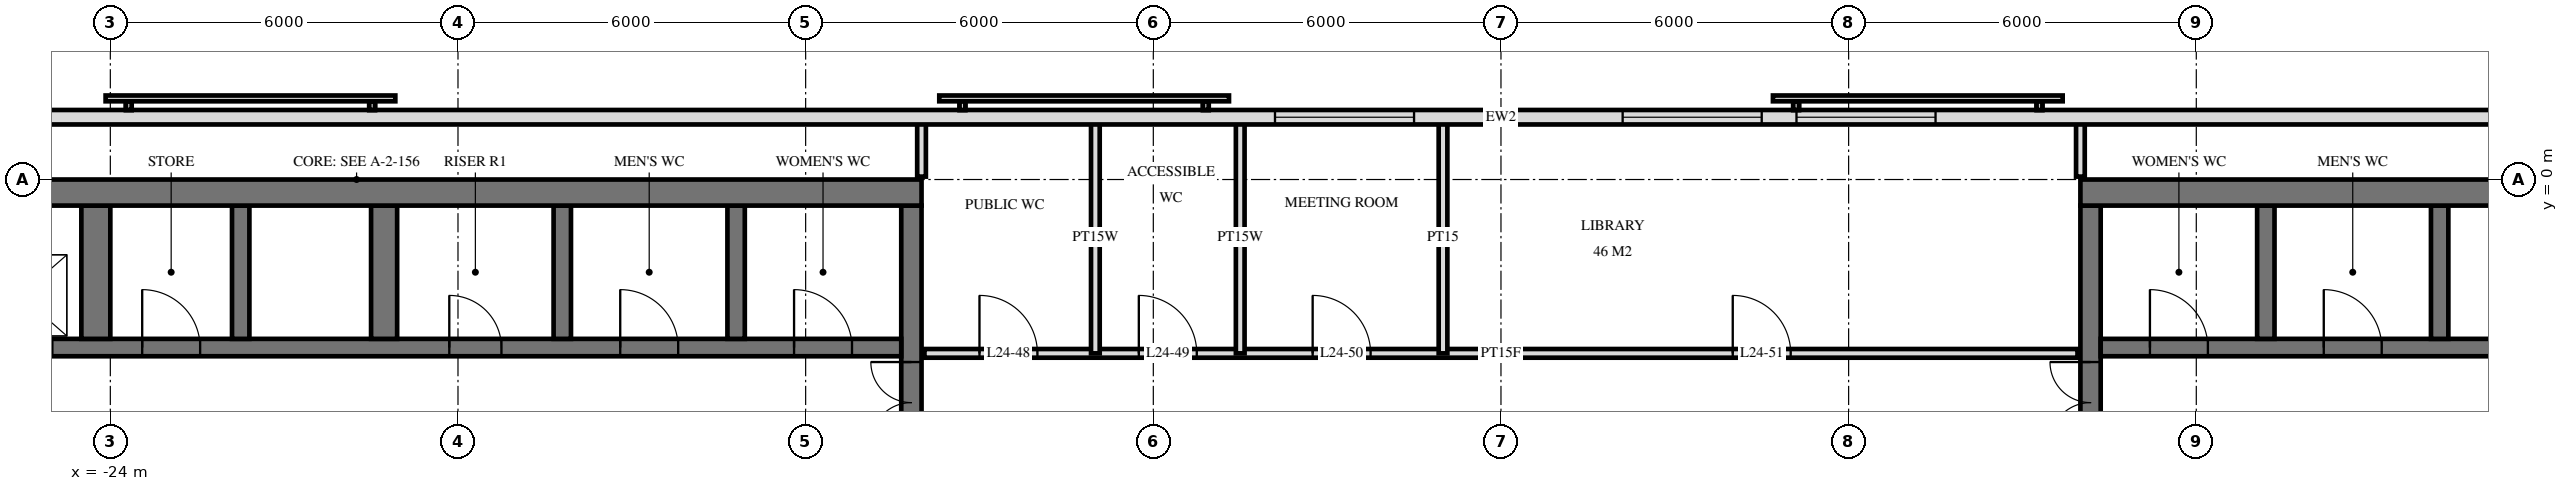
"""IFC4 building model, lengths in metres.
Left out: names, types, materials, properties, quantities, classifications, styles, units other than length and angle.
Written with IfcOpenShell. Run it as: python <this file> out.ifc"""

import sys

from ifc_helpers import new_model, si_unit, direction, frame, frame_2d, origin, place, context, subcontext, project, spatial, rectangle, extrude, element, fill, save


model = new_model("IFC4")
c1 = context("Model", 3, precision=1e-05, world=origin(), true_north=direction((0.0, 1.0)))
c2 = subcontext(c1, "Body", "Model", "MODEL_VIEW")
j1 = project(units=[si_unit("LENGTHUNIT", "METRE"), si_unit("PLANEANGLEUNIT", "RADIAN")], contexts=[c1])
p1 = place(None, origin())
s1 = spatial("IfcSite", under=j1, at=p1, CompositionType="ELEMENT")
p2 = place(p1, origin())
s2 = spatial("IfcBuilding", under=s1, at=p2, CompositionType="ELEMENT")
p3 = place(p2, frame((0.0, 0.0, 96.0)))
s3 = spatial("IfcBuildingStorey", under=s2, at=p3, CompositionType="ELEMENT", Elevation=96.0)
p4 = place(p3, frame((-29.5, -0.225, 0.0), z_axis=(0.0, 0.0, 1.0), x_axis=(1.0, 0.0, 0.0)))
e1 = element("IfcWall", 1, at=p4, inside=s3, PredefinedType="SHEAR", context=c2, shape_type="SweptSolid", body=[
    extrude(rectangle(XDim=19.5, YDim=0.45, at=frame_2d((9.75, 0.0))), origin(), (0.0, 0.0, 1.0), 3.6),
])
p5 = place(p3, frame((-10.175, -14.55, 0.0), z_axis=(0.0, 0.0, 1.0), x_axis=(0.0, 1.0, 0.0)))
e2 = element("IfcWall", 2, at=p5, inside=s3, PredefinedType="SHEAR", context=c2, shape_type="SweptSolid", body=[
    extrude(rectangle(XDim=14.1, YDim=0.35, at=frame_2d((7.05, 0.0))), origin(), (0.0, 0.0, 1.0), 3.6),
])
p6 = place(p5, frame((8.4, 0.0, 0.0)))
e3 = element("IfcOpeningElement", 3, at=p6, cuts=e2, PredefinedType="OPENING", context=c2, shape_type="SweptSolid", body=[
    extrude(rectangle(XDim=1.4, YDim=2.4, at=frame_2d((0.7, 1.2))), frame((0.0, 0.185, 0.0), z_axis=(0.0, -1.0, 0.0), x_axis=(1.0, 0.0, 0.0)), (0.0, 0.0, 1.0), 0.37),
])
p7 = place(p5, frame((10.0, 0.0, 0.0)))
e4 = element("IfcOpeningElement", 4, at=p7, cuts=e2, PredefinedType="OPENING", context=c2, shape_type="SweptSolid", body=[
    extrude(rectangle(XDim=1.4, YDim=2.4, at=frame_2d((0.7, 1.2))), frame((0.0, 0.185, 0.0), z_axis=(0.0, -1.0, 0.0), x_axis=(1.0, 0.0, 0.0)), (0.0, 0.0, 1.0), 0.37),
])
p8 = place(p5, frame((4.0, 0.0, 0.0)))
e5 = element("IfcOpeningElement", 5, at=p8, cuts=e2, PredefinedType="OPENING", context=c2, shape_type="SweptSolid", body=[
    extrude(rectangle(XDim=1.2, YDim=2.1, at=frame_2d((0.6, 1.05))), frame((0.0, 0.185, 0.0), z_axis=(0.0, -1.0, 0.0), x_axis=(1.0, 0.0, 0.0)), (0.0, 0.0, 1.0), 0.37),
])
p9 = place(p3, frame((-29.05, -2.9, 0.0), z_axis=(0.0, 0.0, 1.0), x_axis=(1.0, 0.0, 0.0)))
e6 = element("IfcWall", 6, at=p9, inside=s3, PredefinedType="SHEAR", context=c2, shape_type="SweptSolid", body=[
    extrude(rectangle(XDim=18.7, YDim=0.3, at=frame_2d((9.35, 0.0))), origin(), (0.0, 0.0, 1.0), 3.6),
])
p10 = place(p9, frame((2.95, 0.0, 0.0)))
e7 = element("IfcOpeningElement", 7, at=p10, cuts=e6, PredefinedType="OPENING", context=c2, shape_type="SweptSolid", body=[
    extrude(rectangle(XDim=1.1, YDim=2.1, at=frame_2d((0.55, 1.05))), frame((0.0, 0.16, 0.0), z_axis=(0.0, -1.0, 0.0), x_axis=(1.0, 0.0, 0.0)), (0.0, 0.0, 1.0), 0.32),
])
p11 = place(p9, frame((0.55, 0.0, 0.0)))
e8 = element("IfcOpeningElement", 8, at=p11, cuts=e6, PredefinedType="OPENING", context=c2, shape_type="SweptSolid", body=[
    extrude(rectangle(XDim=1.1, YDim=2.1, at=frame_2d((0.55, 1.05))), frame((0.0, 0.16, 0.0), z_axis=(0.0, -1.0, 0.0), x_axis=(1.0, 0.0, 0.0)), (0.0, 0.0, 1.0), 0.32),
])
p12 = place(p9, frame((10.9, 0.0, 0.0)))
e9 = element("IfcOpeningElement", 9, at=p12, cuts=e6, PredefinedType="OPENING", context=c2, shape_type="SweptSolid", body=[
    extrude(rectangle(XDim=0.9, YDim=2.1, at=frame_2d((0.45, 1.05))), frame((0.0, 0.16, 0.0), z_axis=(0.0, -1.0, 0.0), x_axis=(1.0, 0.0, 0.0)), (0.0, 0.0, 1.0), 0.32),
])
p13 = place(p9, frame((16.85, 0.0, 0.0)))
e10 = element("IfcOpeningElement", 10, at=p13, cuts=e6, PredefinedType="OPENING", context=c2, shape_type="SweptSolid", body=[
    extrude(rectangle(XDim=1.0, YDim=2.1, at=frame_2d((0.5, 1.05))), frame((0.0, 0.16, 0.0), z_axis=(0.0, -1.0, 0.0), x_axis=(1.0, 0.0, 0.0)), (0.0, 0.0, 1.0), 0.32),
])
p14 = place(p9, frame((13.85, 0.0, 0.0)))
e11 = element("IfcOpeningElement", 11, at=p14, cuts=e6, PredefinedType="OPENING", context=c2, shape_type="SweptSolid", body=[
    extrude(rectangle(XDim=1.0, YDim=2.1, at=frame_2d((0.5, 1.05))), frame((0.0, 0.16, 0.0), z_axis=(0.0, -1.0, 0.0), x_axis=(1.0, 0.0, 0.0)), (0.0, 0.0, 1.0), 0.32),
])
p15 = place(p9, frame((5.6, 0.0, 0.0)))
e12 = element("IfcOpeningElement", 12, at=p15, cuts=e6, PredefinedType="OPENING", context=c2, shape_type="SweptSolid", body=[
    extrude(rectangle(XDim=1.0, YDim=2.1, at=frame_2d((0.5, 1.05))), frame((0.0, 0.16, 0.0), z_axis=(0.0, -1.0, 0.0), x_axis=(1.0, 0.0, 0.0)), (0.0, 0.0, 1.0), 0.32),
])
for number, where, z_axis, x_axis in (
    (13, (-13.2, -2.75, 0.0), (0.0, 0.0, 1.0), (0.0, 1.0, 0.0)),
    (14, (-16.2, -2.75, 0.0), (0.0, 0.0, 1.0), (0.0, 1.0, 0.0)),
):
    element("IfcWall", number, at=place(p3, frame(where, z_axis=z_axis, x_axis=x_axis)), inside=s3, PredefinedType="SHEAR", context=c2, shape_type="SweptSolid", body=[
        extrude(rectangle(XDim=2.3, YDim=0.3, at=frame_2d((1.15, 0.0))), origin(), (0.0, 0.0, 1.0), 3.6),
    ])
p16 = place(p3, frame((-19.275, -2.75, 0.0), z_axis=(0.0, 0.0, 1.0), x_axis=(0.0, 1.0, 0.0)))
e15 = element("IfcWall", 15, at=p16, inside=s3, PredefinedType="SHEAR", context=c2, shape_type="SweptSolid", body=[
    extrude(rectangle(XDim=2.3, YDim=0.45, at=frame_2d((1.15, 0.0))), origin(), (0.0, 0.0, 1.0), 3.6),
])
p17 = place(p3, frame((-21.75, -2.75, 0.0), z_axis=(0.0, 0.0, 1.0), x_axis=(0.0, 1.0, 0.0)))
e16 = element("IfcWall", 16, at=p17, inside=s3, PredefinedType="SHEAR", context=c2, shape_type="SweptSolid", body=[
    extrude(rectangle(XDim=2.3, YDim=0.3, at=frame_2d((1.15, 0.0))), origin(), (0.0, 0.0, 1.0), 3.6),
])
p18 = place(p3, frame((-24.25, -2.75, 0.0), z_axis=(0.0, 0.0, 1.0), x_axis=(0.0, 1.0, 0.0)))
e17 = element("IfcWall", 17, at=p18, inside=s3, PredefinedType="SHEAR", context=c2, shape_type="SweptSolid", body=[
    extrude(rectangle(XDim=2.3, YDim=0.5, at=frame_2d((1.15, 0.0))), origin(), (0.0, 0.0, 1.0), 3.6),
])
p19 = place(p3, frame((10.0, -0.225, 0.0), z_axis=(0.0, 0.0, 1.0), x_axis=(1.0, 0.0, 0.0)))
e18 = element("IfcWall", 18, at=p19, inside=s3, PredefinedType="SHEAR", context=c2, shape_type="SweptSolid", body=[
    extrude(rectangle(XDim=19.5, YDim=0.45, at=frame_2d((9.75, 0.0))), origin(), (0.0, 0.0, 1.0), 3.6),
])
p20 = place(p3, frame((10.175, -14.55, 0.0), z_axis=(0.0, 0.0, 1.0), x_axis=(0.0, 1.0, 0.0)))
e19 = element("IfcWall", 19, at=p20, inside=s3, PredefinedType="SHEAR", context=c2, shape_type="SweptSolid", body=[
    extrude(rectangle(XDim=14.1, YDim=0.35, at=frame_2d((7.05, 0.0))), origin(), (0.0, 0.0, 1.0), 3.6),
])
p21 = place(p20, frame((8.4, 0.0, 0.0)))
e20 = element("IfcOpeningElement", 20, at=p21, cuts=e19, PredefinedType="OPENING", context=c2, shape_type="SweptSolid", body=[
    extrude(rectangle(XDim=1.4, YDim=2.4, at=frame_2d((0.7, 1.2))), frame((0.0, 0.185, 0.0), z_axis=(0.0, -1.0, 0.0), x_axis=(1.0, 0.0, 0.0)), (0.0, 0.0, 1.0), 0.37),
])
p22 = place(p20, frame((10.0, 0.0, 0.0)))
e21 = element("IfcOpeningElement", 21, at=p22, cuts=e19, PredefinedType="OPENING", context=c2, shape_type="SweptSolid", body=[
    extrude(rectangle(XDim=1.4, YDim=2.4, at=frame_2d((0.7, 1.2))), frame((0.0, 0.185, 0.0), z_axis=(0.0, -1.0, 0.0), x_axis=(1.0, 0.0, 0.0)), (0.0, 0.0, 1.0), 0.37),
])
p23 = place(p20, frame((4.0, 0.0, 0.0)))
e22 = element("IfcOpeningElement", 22, at=p23, cuts=e19, PredefinedType="OPENING", context=c2, shape_type="SweptSolid", body=[
    extrude(rectangle(XDim=1.2, YDim=2.1, at=frame_2d((0.6, 1.05))), frame((0.0, 0.185, 0.0), z_axis=(0.0, -1.0, 0.0), x_axis=(1.0, 0.0, 0.0)), (0.0, 0.0, 1.0), 0.37),
])
p24 = place(p3, frame((10.35, -2.9, 0.0), z_axis=(0.0, 0.0, 1.0), x_axis=(1.0, 0.0, 0.0)))
e23 = element("IfcWall", 23, at=p24, inside=s3, PredefinedType="SHEAR", context=c2, shape_type="SweptSolid", body=[
    extrude(rectangle(XDim=18.7, YDim=0.3, at=frame_2d((9.35, 0.0))), origin(), (0.0, 0.0, 1.0), 3.6),
])
p25 = place(p24, frame((14.65, 0.0, 0.0)))
e24 = element("IfcOpeningElement", 24, at=p25, cuts=e23, PredefinedType="OPENING", context=c2, shape_type="SweptSolid", body=[
    extrude(rectangle(XDim=1.1, YDim=2.1, at=frame_2d((0.55, 1.05))), frame((0.0, 0.16, 0.0), z_axis=(0.0, -1.0, 0.0), x_axis=(1.0, 0.0, 0.0)), (0.0, 0.0, 1.0), 0.32),
])
p26 = place(p24, frame((17.05, 0.0, 0.0)))
e25 = element("IfcOpeningElement", 25, at=p26, cuts=e23, PredefinedType="OPENING", context=c2, shape_type="SweptSolid", body=[
    extrude(rectangle(XDim=1.1, YDim=2.1, at=frame_2d((0.55, 1.05))), frame((0.0, 0.16, 0.0), z_axis=(0.0, -1.0, 0.0), x_axis=(1.0, 0.0, 0.0)), (0.0, 0.0, 1.0), 0.32),
])
p27 = place(p24, frame((6.9, 0.0, 0.0)))
e26 = element("IfcOpeningElement", 26, at=p27, cuts=e23, PredefinedType="OPENING", context=c2, shape_type="SweptSolid", body=[
    extrude(rectangle(XDim=0.9, YDim=2.1, at=frame_2d((0.45, 1.05))), frame((0.0, 0.16, 0.0), z_axis=(0.0, -1.0, 0.0), x_axis=(1.0, 0.0, 0.0)), (0.0, 0.0, 1.0), 0.32),
])
p28 = place(p24, frame((0.85, 0.0, 0.0)))
e27 = element("IfcOpeningElement", 27, at=p28, cuts=e23, PredefinedType="OPENING", context=c2, shape_type="SweptSolid", body=[
    extrude(rectangle(XDim=1.0, YDim=2.1, at=frame_2d((0.5, 1.05))), frame((0.0, 0.16, 0.0), z_axis=(0.0, -1.0, 0.0), x_axis=(1.0, 0.0, 0.0)), (0.0, 0.0, 1.0), 0.32),
])
p29 = place(p24, frame((3.85, 0.0, 0.0)))
e28 = element("IfcOpeningElement", 28, at=p29, cuts=e23, PredefinedType="OPENING", context=c2, shape_type="SweptSolid", body=[
    extrude(rectangle(XDim=1.0, YDim=2.1, at=frame_2d((0.5, 1.05))), frame((0.0, 0.16, 0.0), z_axis=(0.0, -1.0, 0.0), x_axis=(1.0, 0.0, 0.0)), (0.0, 0.0, 1.0), 0.32),
])
p30 = place(p24, frame((12.1, 0.0, 0.0)))
e29 = element("IfcOpeningElement", 29, at=p30, cuts=e23, PredefinedType="OPENING", context=c2, shape_type="SweptSolid", body=[
    extrude(rectangle(XDim=1.0, YDim=2.1, at=frame_2d((0.5, 1.05))), frame((0.0, 0.16, 0.0), z_axis=(0.0, -1.0, 0.0), x_axis=(1.0, 0.0, 0.0)), (0.0, 0.0, 1.0), 0.32),
])
for number, where, z_axis, x_axis in (
    (30, (13.2, -2.75, 0.0), (0.0, 0.0, 1.0), (0.0, 1.0, 0.0)),
    (31, (16.2, -2.75, 0.0), (0.0, 0.0, 1.0), (0.0, 1.0, 0.0)),
):
    element("IfcWall", number, at=place(p3, frame(where, z_axis=z_axis, x_axis=x_axis)), inside=s3, PredefinedType="SHEAR", context=c2, shape_type="SweptSolid", body=[
        extrude(rectangle(XDim=2.3, YDim=0.3, at=frame_2d((1.15, 0.0))), origin(), (0.0, 0.0, 1.0), 3.6),
    ])
p31 = place(p3, frame((28.775, 1.075, 0.0), z_axis=(0.0, 0.0, 1.0), x_axis=(-1.0, 0.0, 0.0)))
e32 = element("IfcWall", 32, at=p31, inside=s3, PredefinedType="SOLIDWALL", context=c2, shape_type="SweptSolid", body=[
    extrude(rectangle(XDim=57.551, YDim=0.25, at=frame_2d((28.775, 0.0))), origin(), (0.0, 0.0, 1.0), 3.32),
])
p32 = place(p31, frame((21.275, 0.0, 0.3)))
e33 = element("IfcOpeningElement", 33, at=p32, cuts=e32, PredefinedType="OPENING", context=c2, shape_type="SweptSolid", body=[
    extrude(rectangle(XDim=2.4, YDim=2.1, at=frame_2d((1.2, 1.05))), frame((0.0, 0.135, 0.0), z_axis=(0.0, -1.0, 0.0), x_axis=(1.0, 0.0, 0.0)), (0.0, 0.0, 1.0), 0.27),
])
p33 = place(p31, frame((24.275, 0.0, 0.3)))
e34 = element("IfcOpeningElement", 34, at=p33, cuts=e32, PredefinedType="OPENING", context=c2, shape_type="SweptSolid", body=[
    extrude(rectangle(XDim=2.4, YDim=2.1, at=frame_2d((1.2, 1.05))), frame((0.0, 0.135, 0.0), z_axis=(0.0, -1.0, 0.0), x_axis=(1.0, 0.0, 0.0)), (0.0, 0.0, 1.0), 0.27),
])
p34 = place(p31, frame((30.275, 0.0, 0.3)))
e35 = element("IfcOpeningElement", 35, at=p34, cuts=e32, PredefinedType="OPENING", context=c2, shape_type="SweptSolid", body=[
    extrude(rectangle(XDim=2.4, YDim=2.1, at=frame_2d((1.2, 1.05))), frame((0.0, 0.135, 0.0), z_axis=(0.0, -1.0, 0.0), x_axis=(1.0, 0.0, 0.0)), (0.0, 0.0, 1.0), 0.27),
])
p35 = place(p3, frame((10.0, 0.05, 0.0), z_axis=(0.0, 0.0, 1.0), x_axis=(0.0, 1.0, 0.0)))
e36 = element("IfcWall", 36, at=p35, inside=s3, PredefinedType="PARTITIONING", context=c2, shape_type="SweptSolid", body=[
    extrude(rectangle(XDim=0.97, YDim=0.15, at=frame_2d((0.485, 0.0))), origin(), (0.0, 0.0, 1.0), 3.32),
])
p36 = place(p3, frame((-1.0, -3.0, 0.0), z_axis=(0.0, 0.0, 1.0), x_axis=(0.0, 1.0, 0.0)))
e37 = element("IfcWall", 37, at=p36, inside=s3, PredefinedType="PARTITIONING", context=c2, shape_type="SweptSolid", body=[
    extrude(rectangle(XDim=4.02, YDim=0.15, at=frame_2d((2.01, 0.0))), origin(), (0.0, 0.0, 1.0), 3.32),
])
for number, where, z_axis, x_axis in (
    (38, (-4.5, -3.0, 0.0), (0.0, 0.0, 1.0), (0.0, 1.0, 0.0)),
    (39, (-7.0, -3.0, 0.0), (0.0, 0.0, 1.0), (0.0, 1.0, 0.0)),
):
    element("IfcWall", number, at=place(p3, frame(where, z_axis=z_axis, x_axis=x_axis)), inside=s3, PredefinedType="PLUMBINGWALL", context=c2, shape_type="SweptSolid", body=[
        extrude(rectangle(XDim=4.02, YDim=0.15, at=frame_2d((2.01, 0.0))), origin(), (0.0, 0.0, 1.0), 3.32),
    ])
p37 = place(p3, frame((-10.0, 0.05, 0.0), z_axis=(0.0, 0.0, 1.0), x_axis=(0.0, 1.0, 0.0)))
e40 = element("IfcWall", 40, at=p37, inside=s3, PredefinedType="PLUMBINGWALL", context=c2, shape_type="SweptSolid", body=[
    extrude(rectangle(XDim=0.97, YDim=0.15, at=frame_2d((0.485, 0.0))), origin(), (0.0, 0.0, 1.0), 3.32),
])
p38 = place(p3, frame((-9.95, -3.0, 0.0), z_axis=(0.0, 0.0, 1.0), x_axis=(1.0, 0.0, 0.0)))
e41 = element("IfcWall", 41, at=p38, inside=s3, PredefinedType="PARTITIONING", context=c2, shape_type="SweptSolid", body=[
    extrude(rectangle(XDim=19.9, YDim=0.15, at=frame_2d((9.95, 0.0))), origin(), (0.0, 0.0, 1.0), 3.32),
])
p39 = place(p38, frame((0.95, 0.0, 0.0)))
e42 = element("IfcOpeningElement", 42, at=p39, cuts=e41, PredefinedType="OPENING", context=c2, shape_type="SweptSolid", body=[
    extrude(rectangle(XDim=1.0, YDim=2.1, at=frame_2d((0.5, 1.05))), frame((0.0, 0.085, 0.0), z_axis=(0.0, -1.0, 0.0), x_axis=(1.0, 0.0, 0.0)), (0.0, 0.0, 1.0), 0.17),
])
p40 = place(p38, frame((3.7, 0.0, 0.0)))
e43 = element("IfcOpeningElement", 43, at=p40, cuts=e41, PredefinedType="OPENING", context=c2, shape_type="SweptSolid", body=[
    extrude(rectangle(XDim=1.0, YDim=2.1, at=frame_2d((0.5, 1.05))), frame((0.0, 0.085, 0.0), z_axis=(0.0, -1.0, 0.0), x_axis=(1.0, 0.0, 0.0)), (0.0, 0.0, 1.0), 0.17),
])
p41 = place(p38, frame((6.7, 0.0, 0.0)))
e44 = element("IfcOpeningElement", 44, at=p41, cuts=e41, PredefinedType="OPENING", context=c2, shape_type="SweptSolid", body=[
    extrude(rectangle(XDim=1.0, YDim=2.1, at=frame_2d((0.5, 1.05))), frame((0.0, 0.085, 0.0), z_axis=(0.0, -1.0, 0.0), x_axis=(1.0, 0.0, 0.0)), (0.0, 0.0, 1.0), 0.17),
])
p42 = place(p38, frame((13.95, 0.0, 0.0)))
e45 = element("IfcOpeningElement", 45, at=p42, cuts=e41, PredefinedType="OPENING", context=c2, shape_type="SweptSolid", body=[
    extrude(rectangle(XDim=1.0, YDim=2.1, at=frame_2d((0.5, 1.05))), frame((0.0, 0.085, 0.0), z_axis=(0.0, -1.0, 0.0), x_axis=(1.0, 0.0, 0.0)), (0.0, 0.0, 1.0), 0.17),
])
p43 = place(p32, origin())
e46 = element("IfcWindow", 46, at=p43, inside=s3, PartitioningType="SINGLE_PANEL", PredefinedType="WINDOW", context=c2, shape_type="SweptSolid", body=[
    extrude(rectangle(XDim=2.4, YDim=2.1, at=frame_2d((1.2, 1.05))), frame((0.0, 0.03, 0.0), z_axis=(0.0, -1.0, 0.0), x_axis=(1.0, 0.0, 0.0)), (0.0, 0.0, 1.0), 0.06),
])
fill(e33, e46)
p44 = place(p33, origin())
e47 = element("IfcWindow", 47, at=p44, inside=s3, PartitioningType="SINGLE_PANEL", PredefinedType="WINDOW", context=c2, shape_type="SweptSolid", body=[
    extrude(rectangle(XDim=2.4, YDim=2.1, at=frame_2d((1.2, 1.05))), frame((0.0, 0.03, 0.0), z_axis=(0.0, -1.0, 0.0), x_axis=(1.0, 0.0, 0.0)), (0.0, 0.0, 1.0), 0.06),
])
fill(e34, e47)
p45 = place(p34, origin())
e48 = element("IfcWindow", 48, at=p45, inside=s3, PartitioningType="SINGLE_PANEL", PredefinedType="WINDOW", context=c2, shape_type="SweptSolid", body=[
    extrude(rectangle(XDim=2.4, YDim=2.1, at=frame_2d((1.2, 1.05))), frame((0.0, 0.03, 0.0), z_axis=(0.0, -1.0, 0.0), x_axis=(1.0, 0.0, 0.0)), (0.0, 0.0, 1.0), 0.06),
])
fill(e35, e48)
p46 = place(p7, origin())
e49 = element("IfcDoor", 49, at=p46, inside=s3, OperationType="DOUBLE_DOOR_SINGLE_SWING", PredefinedType="DOOR", context=c2, shape_type="SweptSolid", body=[
    extrude(rectangle(XDim=1.4, YDim=2.4, at=frame_2d((0.7, 1.2))), frame((0.0, 0.025, 0.0), z_axis=(0.0, -1.0, 0.0), x_axis=(1.0, 0.0, 0.0)), (0.0, 0.0, 1.0), 0.05),
])
fill(e4, e49)
p47 = place(p12, origin())
e50 = element("IfcDoor", 50, at=p47, inside=s3, OperationType="SINGLE_SWING_RIGHT", PredefinedType="DOOR", context=c2, shape_type="SweptSolid", body=[
    extrude(rectangle(XDim=0.9, YDim=2.1, at=frame_2d((0.45, 1.05))), frame((0.0, 0.025, 0.0), z_axis=(0.0, -1.0, 0.0), x_axis=(1.0, 0.0, 0.0)), (0.0, 0.0, 1.0), 0.05),
])
fill(e9, e50)
p48 = place(p13, origin())
e51 = element("IfcDoor", 51, at=p48, inside=s3, OperationType="SINGLE_SWING_RIGHT", PredefinedType="DOOR", context=c2, shape_type="SweptSolid", body=[
    extrude(rectangle(XDim=1.0, YDim=2.1, at=frame_2d((0.5, 1.05))), frame((0.0, 0.025, 0.0), z_axis=(0.0, -1.0, 0.0), x_axis=(1.0, 0.0, 0.0)), (0.0, 0.0, 1.0), 0.05),
])
fill(e10, e51)
p49 = place(p14, origin())
e52 = element("IfcDoor", 52, at=p49, inside=s3, OperationType="SINGLE_SWING_RIGHT", PredefinedType="DOOR", context=c2, shape_type="SweptSolid", body=[
    extrude(rectangle(XDim=1.0, YDim=2.1, at=frame_2d((0.5, 1.05))), frame((0.0, 0.025, 0.0), z_axis=(0.0, -1.0, 0.0), x_axis=(1.0, 0.0, 0.0)), (0.0, 0.0, 1.0), 0.05),
])
fill(e11, e52)
p50 = place(p15, origin())
e53 = element("IfcDoor", 53, at=p50, inside=s3, OperationType="SINGLE_SWING_RIGHT", PredefinedType="DOOR", context=c2, shape_type="SweptSolid", body=[
    extrude(rectangle(XDim=1.0, YDim=2.1, at=frame_2d((0.5, 1.05))), frame((0.0, 0.025, 0.0), z_axis=(0.0, -1.0, 0.0), x_axis=(1.0, 0.0, 0.0)), (0.0, 0.0, 1.0), 0.05),
])
fill(e12, e53)
p51 = place(p22, origin())
e54 = element("IfcDoor", 54, at=p51, inside=s3, OperationType="DOUBLE_DOOR_SINGLE_SWING", PredefinedType="DOOR", context=c2, shape_type="SweptSolid", body=[
    extrude(rectangle(XDim=1.4, YDim=2.4, at=frame_2d((0.7, 1.2))), frame((0.0, 0.025, 0.0), z_axis=(0.0, -1.0, 0.0), x_axis=(1.0, 0.0, 0.0)), (0.0, 0.0, 1.0), 0.05),
])
fill(e21, e54)
p52 = place(p28, origin())
e55 = element("IfcDoor", 55, at=p52, inside=s3, OperationType="SINGLE_SWING_RIGHT", PredefinedType="DOOR", context=c2, shape_type="SweptSolid", body=[
    extrude(rectangle(XDim=1.0, YDim=2.1, at=frame_2d((0.5, 1.05))), frame((0.0, 0.025, 0.0), z_axis=(0.0, -1.0, 0.0), x_axis=(1.0, 0.0, 0.0)), (0.0, 0.0, 1.0), 0.05),
])
fill(e27, e55)
p53 = place(p29, origin())
e56 = element("IfcDoor", 56, at=p53, inside=s3, OperationType="SINGLE_SWING_RIGHT", PredefinedType="DOOR", context=c2, shape_type="SweptSolid", body=[
    extrude(rectangle(XDim=1.0, YDim=2.1, at=frame_2d((0.5, 1.05))), frame((0.0, 0.025, 0.0), z_axis=(0.0, -1.0, 0.0), x_axis=(1.0, 0.0, 0.0)), (0.0, 0.0, 1.0), 0.05),
])
fill(e28, e56)
p54 = place(p39, origin())
e57 = element("IfcDoor", 57, at=p54, inside=s3, OperationType="SINGLE_SWING_RIGHT", PredefinedType="DOOR", context=c2, shape_type="SweptSolid", body=[
    extrude(rectangle(XDim=1.0, YDim=2.1, at=frame_2d((0.5, 1.05))), frame((0.0, 0.025, 0.0), z_axis=(0.0, -1.0, 0.0), x_axis=(1.0, 0.0, 0.0)), (0.0, 0.0, 1.0), 0.05),
])
fill(e42, e57)
p55 = place(p40, origin())
e58 = element("IfcDoor", 58, at=p55, inside=s3, OperationType="SINGLE_SWING_RIGHT", PredefinedType="DOOR", context=c2, shape_type="SweptSolid", body=[
    extrude(rectangle(XDim=1.0, YDim=2.1, at=frame_2d((0.5, 1.05))), frame((0.0, 0.025, 0.0), z_axis=(0.0, -1.0, 0.0), x_axis=(1.0, 0.0, 0.0)), (0.0, 0.0, 1.0), 0.05),
])
fill(e43, e58)
p56 = place(p41, origin())
e59 = element("IfcDoor", 59, at=p56, inside=s3, OperationType="SINGLE_SWING_RIGHT", PredefinedType="DOOR", context=c2, shape_type="SweptSolid", body=[
    extrude(rectangle(XDim=1.0, YDim=2.1, at=frame_2d((0.5, 1.05))), frame((0.0, 0.025, 0.0), z_axis=(0.0, -1.0, 0.0), x_axis=(1.0, 0.0, 0.0)), (0.0, 0.0, 1.0), 0.05),
])
fill(e44, e59)
p57 = place(p42, origin())
e60 = element("IfcDoor", 60, at=p57, inside=s3, OperationType="SINGLE_SWING_RIGHT", PredefinedType="DOOR", context=c2, shape_type="SweptSolid", body=[
    extrude(rectangle(XDim=1.0, YDim=2.1, at=frame_2d((0.5, 1.05))), frame((0.0, 0.025, 0.0), z_axis=(0.0, -1.0, 0.0), x_axis=(1.0, 0.0, 0.0)), (0.0, 0.0, 1.0), 0.05),
])
fill(e45, e60)
save(model, sys.argv[1])
